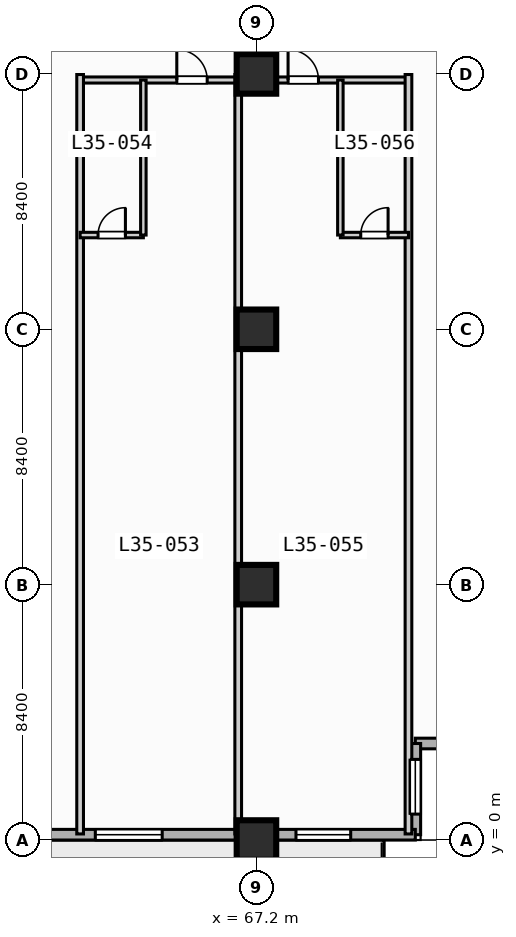
"""IFC4 building model, lengths in metres.
Left out: names, types, materials, properties, quantities, classifications, styles, units other than length and angle.
Written with IfcOpenShell. Run it as: python <this file> out.ifc"""

import sys

from ifc_helpers import new_model, si_unit, direction, frame, frame_2d, origin, origin_2d, place, context, subcontext, project, spatial, rectangle, extrude, element, fill, save


model = new_model("IFC4")
c1 = context("Model", 3, precision=1e-05, world=origin(), true_north=direction((0.0, 1.0)))
c2 = subcontext(c1, "Body", "Model", "MODEL_VIEW")
j1 = project(units=[si_unit("LENGTHUNIT", "METRE"), si_unit("PLANEANGLEUNIT", "RADIAN")], contexts=[c1])
p1 = place(None, origin())
s1 = spatial("IfcSite", under=j1, at=p1, CompositionType="ELEMENT")
p2 = place(p1, origin())
s2 = spatial("IfcBuilding", under=s1, at=p2, CompositionType="ELEMENT")
p3 = place(p2, frame((0.0, 0.0, 145.6)))
s3 = spatial("IfcBuildingStorey", under=s2, at=p3, CompositionType="ELEMENT", Elevation=145.6)
for number, where, z_axis, x_axis in (
    (1, (67.2, 0.0, 0.0), (0.0, 0.0, 1.0), (1.0, 0.0, 0.0)),
    (2, (67.2, 8.4, 0.0), (0.0, 0.0, 1.0), (1.0, 0.0, 0.0)),
    (3, (67.2, 16.8, 0.0), (0.0, 0.0, 1.0), (1.0, 0.0, 0.0)),
    (4, (67.2, 25.2, 0.0), (0.0, 0.0, 1.0), (1.0, 0.0, 0.0)),
):
    element("IfcColumn", number, at=place(p3, frame(where, z_axis=z_axis, x_axis=x_axis)), inside=s3, PredefinedType="COLUMN", context=c2, shape_type="SweptSolid", body=[
        extrude(rectangle(XDim=1.3, YDim=1.3, at=origin_2d()), origin(), (0.0, 0.0, 1.0), 3.8),
    ])
p4 = place(p3, frame((75.425, 3.175, 0.0), z_axis=(0.0, 0.0, 1.0), x_axis=(-1.0, 0.0, 0.0)))
e5 = element("IfcWall", 5, at=p4, inside=s3, PredefinedType="STANDARD", context=c2, shape_type="SweptSolid", body=[
    extrude(rectangle(XDim=3.0, YDim=0.35, at=frame_2d((1.5, 0.0))), origin(), (0.0, 0.0, 1.0), 3.55),
])
p5 = place(p3, frame((72.425, 3.175, 0.0), z_axis=(0.0, 0.0, 1.0), x_axis=(0.0, -1.0, 0.0)))
e6 = element("IfcWall", 6, at=p5, inside=s3, PredefinedType="STANDARD", context=c2, shape_type="SweptSolid", body=[
    extrude(rectangle(XDim=3.0, YDim=0.35, at=frame_2d((1.5, 0.0))), origin(), (0.0, 0.0, 1.0), 3.55),
])
p6 = place(p5, frame((0.522, 0.0, 0.85)))
e7 = element("IfcOpeningElement", 7, at=p6, cuts=e6, PredefinedType="OPENING", context=c2, shape_type="SweptSolid", body=[
    extrude(rectangle(XDim=1.8, YDim=1.8, at=frame_2d((0.9, 0.9))), frame((0.0, 0.185, 0.0), z_axis=(0.0, -1.0, 0.0), x_axis=(1.0, 0.0, 0.0)), (0.0, 0.0, 1.0), 0.37),
])
p7 = place(p3, frame((72.425, 0.175, 0.0), z_axis=(0.0, 0.0, 1.0), x_axis=(-1.0, 0.0, 0.0)))
e8 = element("IfcWall", 8, at=p7, inside=s3, PredefinedType="STANDARD", context=c2, shape_type="SweptSolid", body=[
    extrude(rectangle(XDim=69.25, YDim=0.35, at=frame_2d((34.625, 0.0))), origin(), (0.0, 0.0, 1.0), 3.55),
])
p8 = place(p7, frame((50.725, 0.0, 0.0)))
e9 = element("IfcOpeningElement", 9, at=p8, cuts=e8, PredefinedType="OPENING", context=c2, shape_type="SweptSolid", body=[
    extrude(rectangle(XDim=1.4, YDim=2.2, at=frame_2d((0.7, 1.1))), frame((0.0, 0.185, 0.0), z_axis=(0.0, -1.0, 0.0), x_axis=(1.0, 0.0, 0.0)), (0.0, 0.0, 1.0), 0.37),
])
p9 = place(p7, frame((58.725, 0.0, 0.85)))
e10 = element("IfcOpeningElement", 10, at=p9, cuts=e8, PredefinedType="OPENING", context=c2, shape_type="SweptSolid", body=[
    extrude(rectangle(XDim=2.2, YDim=1.8, at=frame_2d((1.1, 0.9))), frame((0.0, 0.185, 0.0), z_axis=(0.0, -1.0, 0.0), x_axis=(1.0, 0.0, 0.0)), (0.0, 0.0, 1.0), 0.37),
])
p10 = place(p7, frame((33.525, 0.0, 0.85)))
e11 = element("IfcOpeningElement", 11, at=p10, cuts=e8, PredefinedType="OPENING", context=c2, shape_type="SweptSolid", body=[
    extrude(rectangle(XDim=2.2, YDim=1.8, at=frame_2d((1.1, 0.9))), frame((0.0, 0.185, 0.0), z_axis=(0.0, -1.0, 0.0), x_axis=(1.0, 0.0, 0.0)), (0.0, 0.0, 1.0), 0.37),
])
p11 = place(p7, frame((25.125, 0.0, 0.85)))
e12 = element("IfcOpeningElement", 12, at=p11, cuts=e8, PredefinedType="OPENING", context=c2, shape_type="SweptSolid", body=[
    extrude(rectangle(XDim=2.2, YDim=1.8, at=frame_2d((1.1, 0.9))), frame((0.0, 0.185, 0.0), z_axis=(0.0, -1.0, 0.0), x_axis=(1.0, 0.0, 0.0)), (0.0, 0.0, 1.0), 0.37),
])
p12 = place(p7, frame((8.325, 0.0, 0.85)))
e13 = element("IfcOpeningElement", 13, at=p12, cuts=e8, PredefinedType="OPENING", context=c2, shape_type="SweptSolid", body=[
    extrude(rectangle(XDim=2.2, YDim=1.8, at=frame_2d((1.1, 0.9))), frame((0.0, 0.185, 0.0), z_axis=(0.0, -1.0, 0.0), x_axis=(1.0, 0.0, 0.0)), (0.0, 0.0, 1.0), 0.37),
])
p13 = place(p7, frame((2.125, 0.0, 0.85)))
e14 = element("IfcOpeningElement", 14, at=p13, cuts=e8, PredefinedType="OPENING", context=c2, shape_type="SweptSolid", body=[
    extrude(rectangle(XDim=1.8, YDim=1.8, at=frame_2d((0.9, 0.9))), frame((0.0, 0.185, 0.0), z_axis=(0.0, -1.0, 0.0), x_axis=(1.0, 0.0, 0.0)), (0.0, 0.0, 1.0), 0.37),
])
p14 = place(p3, frame((61.4, 25.0, 0.0), z_axis=(0.0, 0.0, 1.0), x_axis=(1.0, 0.0, 0.0)))
e15 = element("IfcWall", 15, at=p14, inside=s3, PredefinedType="PARTITIONING", context=c2, shape_type="SweptSolid", body=[
    extrude(rectangle(XDim=10.8, YDim=0.2, at=frame_2d((5.4, 0.0))), origin(), (0.0, 0.0, 1.0), 2.8),
])
p15 = place(p14, frame((3.18, 0.0, 0.0)))
e16 = element("IfcOpeningElement", 16, at=p15, cuts=e15, PredefinedType="OPENING", context=c2, shape_type="SweptSolid", body=[
    extrude(rectangle(XDim=1.0, YDim=2.15, at=frame_2d((0.5, 1.075))), frame((0.0, 0.11, 0.0), z_axis=(0.0, -1.0, 0.0), x_axis=(1.0, 0.0, 0.0)), (0.0, 0.0, 1.0), 0.22),
])
p16 = place(p14, frame((6.84, 0.0, 0.0)))
e17 = element("IfcOpeningElement", 17, at=p16, cuts=e15, PredefinedType="OPENING", context=c2, shape_type="SweptSolid", body=[
    extrude(rectangle(XDim=1.0, YDim=2.15, at=frame_2d((0.5, 1.075))), frame((0.0, 0.11, 0.0), z_axis=(0.0, -1.0, 0.0), x_axis=(1.0, 0.0, 0.0)), (0.0, 0.0, 1.0), 0.22),
])
p17 = place(p3, frame((61.4, 0.2, 0.0), z_axis=(0.0, 0.0, 1.0), x_axis=(0.0, 1.0, 0.0)))
e18 = element("IfcWall", 18, at=p17, inside=s3, PredefinedType="PARTITIONING", context=c2, shape_type="SweptSolid", body=[
    extrude(rectangle(XDim=24.98, YDim=0.22, at=frame_2d((12.49, 0.0))), origin(), (0.0, 0.0, 1.0), 3.55),
])
p18 = place(p3, frame((61.4, 19.9, 0.0), z_axis=(0.0, 0.0, 1.0), x_axis=(1.0, 0.0, 0.0)))
e19 = element("IfcWall", 19, at=p18, inside=s3, PredefinedType="PLUMBINGWALL", context=c2, shape_type="SweptSolid", body=[
    extrude(rectangle(XDim=2.08, YDim=0.18, at=frame_2d((1.04, 0.0))), origin(), (0.0, 0.0, 1.0), 3.55),
])
p19 = place(p18, frame((0.59, 0.0, 0.0)))
e20 = element("IfcOpeningElement", 20, at=p19, cuts=e19, PredefinedType="OPENING", context=c2, shape_type="SweptSolid", body=[
    extrude(rectangle(XDim=0.9, YDim=2.1, at=frame_2d((0.45, 1.05))), frame((0.0, 0.1, 0.0), z_axis=(0.0, -1.0, 0.0), x_axis=(1.0, 0.0, 0.0)), (0.0, 0.0, 1.0), 0.2),
])
p20 = place(p3, frame((63.48, 19.9, 0.0), z_axis=(0.0, 0.0, 1.0), x_axis=(0.0, 1.0, 0.0)))
e21 = element("IfcWall", 21, at=p20, inside=s3, PredefinedType="PLUMBINGWALL", context=c2, shape_type="SweptSolid", body=[
    extrude(rectangle(XDim=5.1, YDim=0.18, at=frame_2d((2.55, 0.0))), origin(), (0.0, 0.0, 1.0), 3.55),
])
for number, where, z_axis, x_axis in (
    (22, (66.6, 0.2, 0.0), (0.0, 0.0, 1.0), (0.0, 1.0, 0.0)),
    (23, (72.2, 0.2, 0.0), (0.0, 0.0, 1.0), (0.0, 1.0, 0.0)),
):
    element("IfcWall", number, at=place(p3, frame(where, z_axis=z_axis, x_axis=x_axis)), inside=s3, PredefinedType="PARTITIONING", context=c2, shape_type="SweptSolid", body=[
        extrude(rectangle(XDim=24.98, YDim=0.22, at=frame_2d((12.49, 0.0))), origin(), (0.0, 0.0, 1.0), 3.55),
    ])
p21 = place(p3, frame((69.96, 19.9, 0.0), z_axis=(0.0, 0.0, 1.0), x_axis=(1.0, 0.0, 0.0)))
e24 = element("IfcWall", 24, at=p21, inside=s3, PredefinedType="PLUMBINGWALL", context=c2, shape_type="SweptSolid", body=[
    extrude(rectangle(XDim=2.24, YDim=0.18, at=frame_2d((1.12, 0.0))), origin(), (0.0, 0.0, 1.0), 3.55),
])
p22 = place(p21, frame((0.67, 0.0, 0.0)))
e25 = element("IfcOpeningElement", 25, at=p22, cuts=e24, PredefinedType="OPENING", context=c2, shape_type="SweptSolid", body=[
    extrude(rectangle(XDim=0.9, YDim=2.1, at=frame_2d((0.45, 1.05))), frame((0.0, 0.1, 0.0), z_axis=(0.0, -1.0, 0.0), x_axis=(1.0, 0.0, 0.0)), (0.0, 0.0, 1.0), 0.2),
])
p23 = place(p3, frame((69.96, 19.9, 0.0), z_axis=(0.0, 0.0, 1.0), x_axis=(0.0, 1.0, 0.0)))
e26 = element("IfcWall", 26, at=p23, inside=s3, PredefinedType="PLUMBINGWALL", context=c2, shape_type="SweptSolid", body=[
    extrude(rectangle(XDim=5.1, YDim=0.18, at=frame_2d((2.55, 0.0))), origin(), (0.0, 0.0, 1.0), 3.55),
])
p24 = place(p6, origin())
e27 = element("IfcWindow", 27, at=p24, inside=s3, PartitioningType="SINGLE_PANEL", PredefinedType="WINDOW", context=c2, shape_type="SweptSolid", body=[
    extrude(rectangle(XDim=1.8, YDim=1.8, at=frame_2d((0.9, 0.9))), frame((0.0, 0.03, 0.0), z_axis=(0.0, -1.0, 0.0), x_axis=(1.0, 0.0, 0.0)), (0.0, 0.0, 1.0), 0.06),
])
fill(e7, e27)
p25 = place(p12, origin())
e28 = element("IfcWindow", 28, at=p25, inside=s3, PartitioningType="SINGLE_PANEL", PredefinedType="WINDOW", context=c2, shape_type="SweptSolid", body=[
    extrude(rectangle(XDim=2.2, YDim=1.8, at=frame_2d((1.1, 0.9))), frame((0.0, 0.03, 0.0), z_axis=(0.0, -1.0, 0.0), x_axis=(1.0, 0.0, 0.0)), (0.0, 0.0, 1.0), 0.06),
])
fill(e13, e28)
p26 = place(p13, origin())
e29 = element("IfcWindow", 29, at=p26, inside=s3, PartitioningType="SINGLE_PANEL", PredefinedType="WINDOW", context=c2, shape_type="SweptSolid", body=[
    extrude(rectangle(XDim=1.8, YDim=1.8, at=frame_2d((0.9, 0.9))), frame((0.0, 0.03, 0.0), z_axis=(0.0, -1.0, 0.0), x_axis=(1.0, 0.0, 0.0)), (0.0, 0.0, 1.0), 0.06),
])
fill(e14, e29)
p27 = place(p15, origin())
e30 = element("IfcDoor", 30, at=p27, inside=s3, OperationType="SINGLE_SWING_LEFT", PredefinedType="DOOR", context=c2, shape_type="SweptSolid", body=[
    extrude(rectangle(XDim=1.0, YDim=2.15, at=frame_2d((0.5, 1.075))), frame((0.0, 0.025, 0.0), z_axis=(0.0, -1.0, 0.0), x_axis=(1.0, 0.0, 0.0)), (0.0, 0.0, 1.0), 0.05),
])
fill(e16, e30)
p28 = place(p16, origin())
e31 = element("IfcDoor", 31, at=p28, inside=s3, OperationType="SINGLE_SWING_LEFT", PredefinedType="DOOR", context=c2, shape_type="SweptSolid", body=[
    extrude(rectangle(XDim=1.0, YDim=2.15, at=frame_2d((0.5, 1.075))), frame((0.0, 0.025, 0.0), z_axis=(0.0, -1.0, 0.0), x_axis=(1.0, 0.0, 0.0)), (0.0, 0.0, 1.0), 0.05),
])
fill(e17, e31)
p29 = place(p19, origin())
e32 = element("IfcDoor", 32, at=p29, inside=s3, OperationType="SINGLE_SWING_RIGHT", PredefinedType="DOOR", context=c2, shape_type="SweptSolid", body=[
    extrude(rectangle(XDim=0.9, YDim=2.1, at=frame_2d((0.45, 1.05))), frame((0.0, 0.025, 0.0), z_axis=(0.0, -1.0, 0.0), x_axis=(1.0, 0.0, 0.0)), (0.0, 0.0, 1.0), 0.05),
])
fill(e20, e32)
p30 = place(p22, origin())
e33 = element("IfcDoor", 33, at=p30, inside=s3, OperationType="SINGLE_SWING_RIGHT", PredefinedType="DOOR", context=c2, shape_type="SweptSolid", body=[
    extrude(rectangle(XDim=0.9, YDim=2.1, at=frame_2d((0.45, 1.05))), frame((0.0, 0.025, 0.0), z_axis=(0.0, -1.0, 0.0), x_axis=(1.0, 0.0, 0.0)), (0.0, 0.0, 1.0), 0.05),
])
fill(e25, e33)
save(model, sys.argv[1])
